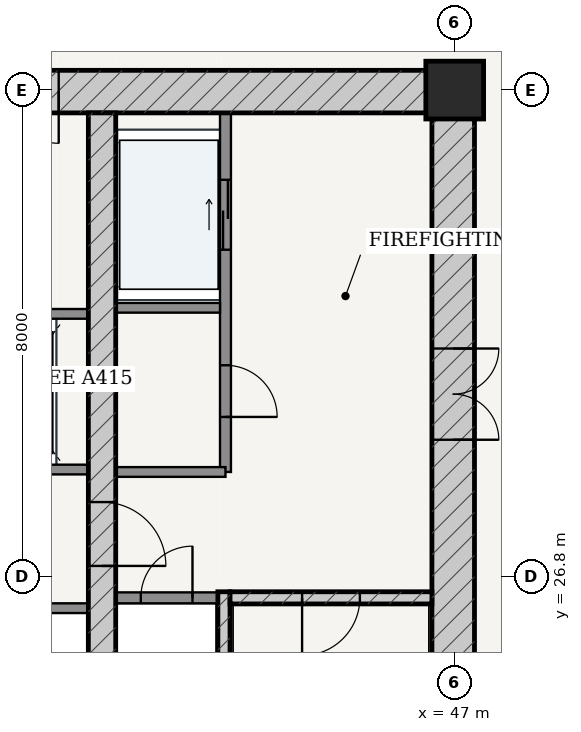
"""IFC4 building model, lengths in metres.
Left out: names, types, materials, properties, quantities, classifications, styles, units other than length and angle.
Written with IfcOpenShell. Run it as: python <this file> out.ifc"""

import sys

from ifc_helpers import new_model, si_unit, direction, frame, frame_2d, origin, origin_2d, place, context, subcontext, project, spatial, rectangle, extrude, source, transform, mapped, element, fill, save


model = new_model("IFC4")
c1 = context("Model", 3, precision=1e-05, world=origin(), true_north=direction((-0.2419218956, 0.970295726276)))
c2 = subcontext(c1, "Body", "Model", "MODEL_VIEW")
j1 = project(units=[si_unit("LENGTHUNIT", "METRE"), si_unit("PLANEANGLEUNIT", "RADIAN")], contexts=[c1])
p1 = place(None, origin())
s1 = spatial("IfcSite", under=j1, at=p1, CompositionType="ELEMENT")
p2 = place(p1, origin())
s2 = spatial("IfcBuilding", under=s1, at=p2, CompositionType="ELEMENT")
p3 = place(p2, frame((0.0, 0.0, 87.0)))
s3 = spatial("IfcBuildingStorey", under=s2, at=p3, CompositionType="ELEMENT", Elevation=87.0)
p4 = place(p3, frame((47.0, 34.8, 0.0), z_axis=(0.0, 0.0, 1.0), x_axis=(1.0, 0.0, 0.0)))
e1 = element("IfcColumn", 1, at=p4, inside=s3, PredefinedType="COLUMN", context=c2, shape_type="SweptSolid", body=[
    extrude(rectangle(XDim=0.95, YDim=0.95, at=origin_2d()), origin(), (0.0, 0.0, 1.0), 3.6),
])
p5 = place(p3, frame((28.675, 34.775, 0.0), z_axis=(0.0, 0.0, 1.0), x_axis=(1.0, 0.0, 0.0)))
e2 = element("IfcWall", 2, at=p5, inside=s3, PredefinedType="SHEAR", context=c2, shape_type="SweptSolid", body=[
    extrude(rectangle(XDim=18.65, YDim=0.7, at=frame_2d((9.325, 0.0))), origin(), (0.0, 0.0, 1.0), 3.325),
])
p6 = place(p5, frame((6.837, 0.0, 0.0)))
e3 = element("IfcOpeningElement", 3, at=p6, cuts=e2, PredefinedType="OPENING", context=c2, shape_type="SweptSolid", body=[
    extrude(rectangle(XDim=0.85, YDim=2.1, at=frame_2d((0.425, 1.05))), frame((0.0, 0.36, 0.0), z_axis=(0.0, -1.0, 0.0), x_axis=(1.0, 0.0, 0.0)), (0.0, 0.0, 1.0), 0.72),
])
p7 = place(p5, frame((8.895, 0.0, 0.0)))
e4 = element("IfcOpeningElement", 4, at=p7, cuts=e2, PredefinedType="OPENING", context=c2, shape_type="SweptSolid", body=[
    extrude(rectangle(XDim=0.86, YDim=2.1, at=frame_2d((0.43, 1.05))), frame((0.0, 0.36, 0.0), z_axis=(0.0, -1.0, 0.0), x_axis=(1.0, 0.0, 0.0)), (0.0, 0.0, 1.0), 0.72),
])
p8 = place(p5, frame((10.962, 0.0, 0.0)))
e5 = element("IfcOpeningElement", 5, at=p8, cuts=e2, PredefinedType="OPENING", context=c2, shape_type="SweptSolid", body=[
    extrude(rectangle(XDim=0.85, YDim=2.1, at=frame_2d((0.425, 1.05))), frame((0.0, 0.36, 0.0), z_axis=(0.0, -1.0, 0.0), x_axis=(1.0, 0.0, 0.0)), (0.0, 0.0, 1.0), 0.72),
])
p9 = place(p3, frame((46.975, 19.175, 0.0), z_axis=(0.0, 0.0, 1.0), x_axis=(0.0, 1.0, 0.0)))
e6 = element("IfcWall", 6, at=p9, inside=s3, PredefinedType="SHEAR", context=c2, shape_type="SweptSolid", body=[
    extrude(rectangle(XDim=15.25, YDim=0.7, at=frame_2d((7.625, 0.0))), origin(), (0.0, 0.0, 1.0), 3.325),
])
p10 = place(p9, frame((9.875, 0.0, 0.0)))
e7 = element("IfcOpeningElement", 7, at=p10, cuts=e6, PredefinedType="OPENING", context=c2, shape_type="SweptSolid", body=[
    extrude(rectangle(XDim=1.5, YDim=2.2, at=frame_2d((0.75, 1.1))), frame((0.0, 0.36, 0.0), z_axis=(0.0, -1.0, 0.0), x_axis=(1.0, 0.0, 0.0)), (0.0, 0.0, 1.0), 0.72),
])
p11 = place(p3, frame((43.205, 19.175, 0.0), z_axis=(0.0, 0.0, 1.0), x_axis=(0.0, 1.0, 0.0)))
e8 = element("IfcWall", 8, at=p11, inside=s3, PredefinedType="SOLIDWALL", context=c2, shape_type="SweptSolid", body=[
    extrude(rectangle(XDim=7.375, YDim=0.2, at=frame_2d((3.688, 0.0))), origin(), (0.0, 0.0, 1.0), 3.325),
])
p12 = place(p3, frame((43.305, 26.45, 0.0), z_axis=(0.0, 0.0, 1.0), x_axis=(1.0, 0.0, 0.0)))
e9 = element("IfcWall", 9, at=p12, inside=s3, PredefinedType="SOLIDWALL", context=c2, shape_type="SweptSolid", body=[
    extrude(rectangle(XDim=3.32, YDim=0.2, at=frame_2d((1.66, 0.0))), origin(), (0.0, 0.0, 1.0), 3.325),
])
p13 = place(p12, frame((1.185, 0.0, 0.0)))
e10 = element("IfcOpeningElement", 10, at=p13, cuts=e9, PredefinedType="OPENING", context=c2, shape_type="SweptSolid", body=[
    extrude(rectangle(XDim=0.95, YDim=2.15, at=frame_2d((0.475, 1.075))), frame((0.0, 0.11, 0.0), z_axis=(0.0, -1.0, 0.0), x_axis=(1.0, 0.0, 0.0)), (0.0, 0.0, 1.0), 0.22),
])
p14 = place(p3, frame((41.2, 19.175, 0.0), z_axis=(0.0, 0.0, 1.0), x_axis=(0.0, 1.0, 0.0)))
e11 = element("IfcWall", 11, at=p14, inside=s3, PredefinedType="SHEAR", context=c2, shape_type="SweptSolid", body=[
    extrude(rectangle(XDim=15.25, YDim=0.45, at=frame_2d((7.625, 0.0))), origin(), (0.0, 0.0, 1.0), 3.325),
])
p15 = place(p14, frame((7.8, 0.0, 0.0)))
e12 = element("IfcOpeningElement", 12, at=p15, cuts=e11, PredefinedType="OPENING", context=c2, shape_type="SweptSolid", body=[
    extrude(rectangle(XDim=1.05, YDim=2.15, at=frame_2d((0.525, 1.075))), frame((0.0, 0.235, 0.0), z_axis=(0.0, -1.0, 0.0), x_axis=(1.0, 0.0, 0.0)), (0.0, 0.0, 1.0), 0.47),
])
p16 = place(p3, frame((41.425, 26.45, 0.0), z_axis=(0.0, 0.0, 1.0), x_axis=(1.0, 0.0, 0.0)))
e13 = element("IfcWall", 13, at=p16, inside=s3, PredefinedType="PARTITIONING", context=c2, shape_type="SweptSolid", body=[
    extrude(rectangle(XDim=1.675, YDim=0.18, at=frame_2d((0.837, 0.0))), origin(), (0.0, 0.0, 1.0), 3.325),
])
p17 = place(p16, frame((0.413, 0.0, 0.0)))
e14 = element("IfcOpeningElement", 14, at=p17, cuts=e13, PredefinedType="OPENING", context=c2, shape_type="SweptSolid", body=[
    extrude(rectangle(XDim=0.85, YDim=2.1, at=frame_2d((0.425, 1.05))), frame((0.0, 0.1, 0.0), z_axis=(0.0, -1.0, 0.0), x_axis=(1.0, 0.0, 0.0)), (0.0, 0.0, 1.0), 0.2),
])
p18 = place(p3, frame((43.23, 28.52, 0.0), z_axis=(0.0, 0.0, 1.0), x_axis=(0.0, 1.0, 0.0)))
e15 = element("IfcWall", 15, at=p18, inside=s3, PredefinedType="PARTITIONING", context=c2, shape_type="SweptSolid", body=[
    extrude(rectangle(XDim=5.905, YDim=0.18, at=frame_2d((2.953, 0.0))), origin(), (0.0, 0.0, 1.0), 3.325),
])
p19 = place(p18, frame((0.905, 0.0, 0.0)))
e16 = element("IfcOpeningElement", 16, at=p19, cuts=e15, PredefinedType="OPENING", context=c2, shape_type="SweptSolid", body=[
    extrude(rectangle(XDim=0.85, YDim=2.1, at=frame_2d((0.425, 1.05))), frame((0.0, 0.1, 0.0), z_axis=(0.0, -1.0, 0.0), x_axis=(1.0, 0.0, 0.0)), (0.0, 0.0, 1.0), 0.2),
])
p20 = place(p18, frame((3.655, 0.0, 0.0)))
e17 = element("IfcOpeningElement", 17, at=p20, cuts=e15, PredefinedType="OPENING", context=c2, shape_type="SweptSolid", body=[
    extrude(rectangle(XDim=1.15, YDim=2.2, at=frame_2d((0.575, 1.1))), frame((0.0, 0.1, 0.0), z_axis=(0.0, -1.0, 0.0), x_axis=(1.0, 0.0, 0.0)), (0.0, 0.0, 1.0), 0.2),
])
p21 = place(p3, frame((41.425, 31.22, 0.0), z_axis=(0.0, 0.0, 1.0), x_axis=(1.0, 0.0, 0.0)))
e18 = element("IfcWall", 18, at=p21, inside=s3, PredefinedType="PARTITIONING", context=c2, shape_type="SweptSolid", body=[
    extrude(rectangle(XDim=1.715, YDim=0.16, at=frame_2d((0.857, 0.0))), origin(), (0.0, 0.0, 1.0), 3.325),
])
p22 = place(p3, frame((41.425, 28.52, 0.0), z_axis=(0.0, 0.0, 1.0), x_axis=(1.0, 0.0, 0.0)))
e19 = element("IfcWall", 19, at=p22, inside=s3, PredefinedType="PARTITIONING", context=c2, shape_type="SweptSolid", body=[
    extrude(rectangle(XDim=1.805, YDim=0.16, at=frame_2d((0.902, 0.0))), origin(), (0.0, 0.0, 1.0), 3.325),
])
p23 = place(p3, frame((35.025, 28.56, 0.0), z_axis=(0.0, 0.0, 1.0), x_axis=(1.0, 0.0, 0.0)))
e20 = element("IfcWall", 20, at=p23, inside=s3, PredefinedType="PARTITIONING", context=c2, shape_type="SweptSolid", body=[
    extrude(rectangle(XDim=5.95, YDim=0.16, at=frame_2d((2.975, 0.0))), origin(), (0.0, 0.0, 1.0), 3.325),
])
p24 = place(p23, frame((0.76, 0.0, 0.0)))
e21 = element("IfcOpeningElement", 21, at=p24, cuts=e20, PredefinedType="OPENING", context=c2, shape_type="SweptSolid", body=[
    extrude(rectangle(XDim=1.1, YDim=2.2, at=frame_2d((0.55, 1.1))), frame((0.0, 0.09, 0.0), z_axis=(0.0, -1.0, 0.0), x_axis=(1.0, 0.0, 0.0)), (0.0, 0.0, 1.0), 0.18),
])
p25 = place(p23, frame((2.425, 0.0, 0.0)))
e22 = element("IfcOpeningElement", 22, at=p25, cuts=e20, PredefinedType="OPENING", context=c2, shape_type="SweptSolid", body=[
    extrude(rectangle(XDim=1.1, YDim=2.2, at=frame_2d((0.55, 1.1))), frame((0.0, 0.09, 0.0), z_axis=(0.0, -1.0, 0.0), x_axis=(1.0, 0.0, 0.0)), (0.0, 0.0, 1.0), 0.18),
])
p26 = place(p23, frame((4.09, 0.0, 0.0)))
e23 = element("IfcOpeningElement", 23, at=p26, cuts=e20, PredefinedType="OPENING", context=c2, shape_type="SweptSolid", body=[
    extrude(rectangle(XDim=1.1, YDim=2.2, at=frame_2d((0.55, 1.1))), frame((0.0, 0.09, 0.0), z_axis=(0.0, -1.0, 0.0), x_axis=(1.0, 0.0, 0.0)), (0.0, 0.0, 1.0), 0.18),
])
for number, where, z_axis, x_axis in (
    (24, (35.025, 31.12, 0.0), (0.0, 0.0, 1.0), (1.0, 0.0, 0.0)),
    (25, (35.025, 26.28, 0.0), (0.0, 0.0, 1.0), (1.0, 0.0, 0.0)),
):
    element("IfcWall", number, at=place(p3, frame(where, z_axis=z_axis, x_axis=x_axis)), inside=s3, PredefinedType="PARTITIONING", context=c2, shape_type="SweptSolid", body=[
        extrude(rectangle(XDim=5.95, YDim=0.16, at=frame_2d((2.975, 0.0))), origin(), (0.0, 0.0, 1.0), 3.325),
    ])
m1 = source(origin(), c2, "Body", "SweptSolid", [
    extrude(rectangle(XDim=1.5, YDim=2.2, at=frame_2d((0.75, 1.1))), frame((0.0, 0.025, 0.0), z_axis=(0.0, -1.0, 0.0), x_axis=(1.0, 0.0, 0.0)), (0.0, 0.0, 1.0), 0.05),
])
p27 = place(p10, frame((1.5, 0.0, 0.0), z_axis=(0.0, 0.0, 1.0), x_axis=(-1.0, 0.0, 0.0)))
e26 = element("IfcDoor", 26, at=p27, inside=s3, OperationType="DOUBLE_DOOR_SINGLE_SWING", PredefinedType="DOOR", context=c2, shape_type="MappedRepresentation", body=[
    mapped(m1, transform((0.0, 0.0, 0.0), scale=1.0)),
])
fill(e7, e26)
m2 = source(origin(), c2, "Body", "SweptSolid", [
    extrude(rectangle(XDim=1.05, YDim=2.15, at=frame_2d((0.525, 1.075))), frame((0.0, 0.025, 0.0), z_axis=(0.0, -1.0, 0.0), x_axis=(1.0, 0.0, 0.0)), (0.0, 0.0, 1.0), 0.05),
])
p28 = place(p15, frame((1.05, 0.0, 0.0), z_axis=(0.0, 0.0, 1.0), x_axis=(-1.0, 0.0, 0.0)))
e27 = element("IfcDoor", 27, at=p28, inside=s3, OperationType="SINGLE_SWING_RIGHT", PredefinedType="DOOR", context=c2, shape_type="MappedRepresentation", body=[
    mapped(m2, transform((0.0, 0.0, 0.0), scale=1.0)),
])
fill(e12, e27)
m3 = source(origin(), c2, "Body", "SweptSolid", [
    extrude(rectangle(XDim=0.95, YDim=2.15, at=frame_2d((0.475, 1.075))), frame((0.0, 0.025, 0.0), z_axis=(0.0, -1.0, 0.0), x_axis=(1.0, 0.0, 0.0)), (0.0, 0.0, 1.0), 0.05),
])
p29 = place(p13, frame((0.95, 0.0, 0.0), z_axis=(0.0, 0.0, 1.0), x_axis=(-1.0, 0.0, 0.0)))
e28 = element("IfcDoor", 28, at=p29, inside=s3, OperationType="SINGLE_SWING_RIGHT", PredefinedType="DOOR", context=c2, shape_type="MappedRepresentation", body=[
    mapped(m3, transform((0.0, 0.0, 0.0), scale=1.0)),
])
fill(e10, e28)
m4 = source(origin(), c2, "Body", "SweptSolid", [
    extrude(rectangle(XDim=0.85, YDim=2.1, at=frame_2d((0.425, 1.05))), frame((0.0, 0.025, 0.0), z_axis=(0.0, -1.0, 0.0), x_axis=(1.0, 0.0, 0.0)), (0.0, 0.0, 1.0), 0.05),
])
p30 = place(p17, origin())
e29 = element("IfcDoor", 29, at=p30, inside=s3, OperationType="SINGLE_SWING_RIGHT", PredefinedType="DOOR", context=c2, shape_type="MappedRepresentation", body=[
    mapped(m4, transform((0.0, 0.0, 0.0), scale=1.0)),
])
fill(e14, e29)
p31 = place(p19, frame((0.85, 0.0, 0.0), z_axis=(0.0, 0.0, 1.0), x_axis=(-1.0, 0.0, 0.0)))
e30 = element("IfcDoor", 30, at=p31, inside=s3, OperationType="SINGLE_SWING_RIGHT", PredefinedType="DOOR", context=c2, shape_type="MappedRepresentation", body=[
    mapped(m4, transform((0.0, 0.0, 0.0), scale=1.0)),
])
fill(e16, e30)
p32 = place(p8, frame((0.85, 0.0, 0.0), z_axis=(0.0, 0.0, 1.0), x_axis=(-1.0, 0.0, 0.0)))
e31 = element("IfcDoor", 31, at=p32, inside=s3, OperationType="SINGLE_SWING_LEFT", PredefinedType="DOOR", context=c2, shape_type="MappedRepresentation", body=[
    mapped(m4, transform((0.0, 0.0, 0.0), scale=1.0)),
])
fill(e5, e31)
m5 = source(origin(), c2, "Body", "SweptSolid", [
    extrude(rectangle(XDim=1.15, YDim=2.2, at=frame_2d((0.575, 1.1))), frame((0.0, 0.025, 0.0), z_axis=(0.0, -1.0, 0.0), x_axis=(1.0, 0.0, 0.0)), (0.0, 0.0, 1.0), 0.05),
])
p33 = place(p20, origin())
e32 = element("IfcDoor", 32, at=p33, inside=s3, OperationType="DOUBLE_DOOR_SLIDING", PredefinedType="DOOR", context=c2, shape_type="MappedRepresentation", body=[
    mapped(m5, transform((0.0, 0.0, 0.0), scale=1.0)),
])
fill(e17, e32)
save(model, sys.argv[1])
